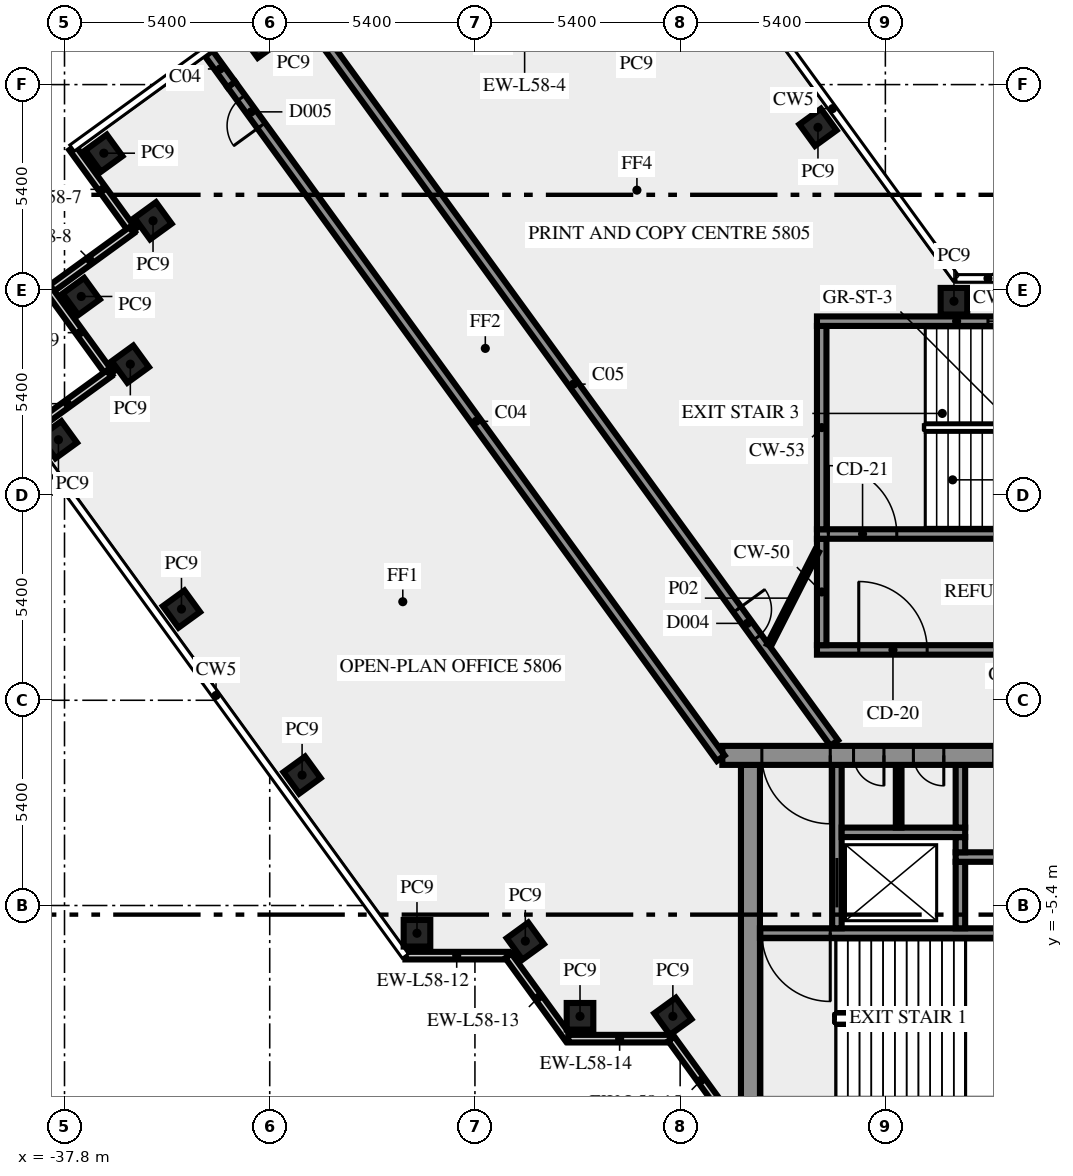
"""IFC4 building model, lengths in metres.
Left out: names, types, materials, properties, quantities, classifications, styles, units other than length and angle.
Written with IfcOpenShell. Run it as: python <this file> out.ifc"""

import sys

from ifc_helpers import new_model, si_unit, direction, frame, frame_2d, origin, origin_2d, place, context, subcontext, project, spatial, rectangle, extrude, element, fill, save


model = new_model("IFC4")
c1 = context("Model", 3, precision=1e-05, world=origin(), true_north=direction((0.0, 1.0)))
c2 = subcontext(c1, "Body", "Model", "MODEL_VIEW")
j1 = project(units=[si_unit("LENGTHUNIT", "METRE"), si_unit("PLANEANGLEUNIT", "RADIAN")], contexts=[c1])
p1 = place(None, origin())
s1 = spatial("IfcSite", under=j1, at=p1, CompositionType="ELEMENT")
p2 = place(p1, origin())
s2 = spatial("IfcBuilding", under=s1, at=p2, CompositionType="ELEMENT")
p3 = place(p2, frame((0.0, 0.0, 248.0)))
s3 = spatial("IfcBuildingStorey", under=s2, at=p3, CompositionType="ELEMENT", Elevation=248.0)
for number, where, z_axis, x_axis in (
    (1, (-17.974, 15.075, 0.0), (0.0, 0.0, 1.0), (-0.588, 0.809, 0.0)),
    (2, (-32.637, 17.393, 0.0), (0.0, 0.0, 1.0), (-0.809, -0.588, 0.0)),
    (3, (-36.765, 14.395, 0.0), (0.0, 0.0, 1.0), (0.588, -0.809, 0.0)),
    (4, (-35.471, 12.616, 0.0), (0.0, 0.0, 1.0), (-0.809, -0.588, 0.0)),
    (5, (-37.36, 10.625, 0.0), (0.0, 0.0, 1.0), (0.588, -0.809, 0.0)),
    (6, (-36.068, 8.844, 0.0), (0.0, 0.0, 1.0), (0.588, -0.809, 0.0)),
    (7, (-37.96, 6.855, 0.0), (0.0, 0.0, 1.0), (0.588, -0.809, 0.0)),
    (8, (-34.722, 2.4, 0.0), (0.0, 0.0, 1.0), (0.588, -0.809, 0.0)),
    (9, (-31.548, -1.969, 0.0), (0.0, 0.0, 1.0), (0.588, -0.809, 0.0)),
    (10, (-28.525, -6.13, 0.0), (0.0, 0.0, 1.0), (1.0, 0.0, 0.0)),
    (11, (-25.674, -6.337, 0.0), (0.0, 0.0, 1.0), (0.588, -0.809, 0.0)),
    (12, (-24.235, -8.315, 0.0), (0.0, 0.0, 1.0), (1.0, 0.0, 0.0)),
    (13, (-21.792, -8.315, 0.0), (0.0, 0.0, 1.0), (0.588, -0.809, 0.0)),
    (14, (-14.395, 10.5, 0.0), (0.0, 0.0, 1.0), (-1.0, 0.0, 0.0)),
):
    element("IfcColumn", number, at=place(p3, frame(where, z_axis=z_axis, x_axis=x_axis)), inside=s3, PredefinedType="COLUMN", context=c2, shape_type="SweptSolid", body=[
        extrude(rectangle(XDim=0.7, YDim=0.7, at=origin_2d()), origin(), (0.0, 0.0, 1.0), 4.65),
    ])
for number, where, z_axis, x_axis in (
    (15, (-37.592, 14.536, 0.0), (0.0, 0.0, 1.0), (0.588, -0.809, 0.0)),
    (16, (-36.032, 12.369, 0.0), (0.0, 0.0, 1.0), (-0.809, -0.588, 0.0)),
    (17, (-38.189, 10.765, 0.0), (0.0, 0.0, 1.0), (0.588, -0.809, 0.0)),
    (18, (-36.629, 8.597, 0.0), (0.0, 0.0, 1.0), (-0.809, -0.588, 0.0)),
    (19, (-28.83, -6.719, 0.0), (0.0, 0.0, 1.0), (1.0, 0.0, 0.0)),
):
    element("IfcWall", number, at=place(p3, frame(where, z_axis=z_axis, x_axis=x_axis)), inside=s3, PredefinedType="SOLIDWALL", context=c2, shape_type="SweptSolid", body=[
        extrude(rectangle(XDim=2.7, YDim=0.2, at=frame_2d((1.35, 0.0))), origin(), (0.0, 0.0, 1.0), 4.65),
    ])
p4 = place(p3, frame((-26.12, -6.724, 0.0), z_axis=(0.0, 0.0, 1.0), x_axis=(0.587720002413, -0.809064397168, 0.0)))
e20 = element("IfcWall", 20, at=p4, inside=s3, PredefinedType="SOLIDWALL", context=c2, shape_type="SweptSolid", body=[
    extrude(rectangle(XDim=2.7, YDim=0.2, at=frame_2d((1.35, 0.0))), origin(), (0.0, 0.0, 1.0), 4.65),
])
p5 = place(p3, frame((-24.543, -8.904, 0.0), z_axis=(0.0, 0.0, 1.0), x_axis=(1.0, 0.0, 0.0)))
e21 = element("IfcWall", 21, at=p5, inside=s3, PredefinedType="SOLIDWALL", context=c2, shape_type="SweptSolid", body=[
    extrude(rectangle(XDim=2.7, YDim=0.2, at=frame_2d((1.35, 0.0))), origin(), (0.0, 0.0, 1.0), 4.65),
])
p6 = place(p3, frame((-21.833, -8.909, 0.0), z_axis=(0.0, 0.0, 1.0), x_axis=(0.587766567315, -0.809030569476, 0.0)))
e22 = element("IfcWall", 22, at=p6, inside=s3, PredefinedType="SOLIDWALL", context=c2, shape_type="SweptSolid", body=[
    extrude(rectangle(XDim=2.688, YDim=0.2, at=frame_2d((1.344, 0.0))), origin(), (0.0, 0.0, 1.0), 4.65),
])
p7 = place(p3, frame((-19.75, -10.5, 0.0), z_axis=(0.0, 0.0, 1.0), x_axis=(0.0, 1.0, 0.0)))
e23 = element("IfcWall", 23, at=p7, inside=s3, PredefinedType="SHEAR", context=c2, shape_type="SweptSolid", body=[
    extrude(rectangle(XDim=8.8, YDim=0.5, at=frame_2d((4.4, 0.0))), origin(), (0.0, 0.0, 1.0), 4.65),
])
p8 = place(p3, frame((-11.45, -6.125, 0.0), z_axis=(0.0, 0.0, 1.0), x_axis=(-1.0, 0.0, 0.0)))
e24 = element("IfcWall", 24, at=p8, inside=s3, PredefinedType="SHEAR", context=c2, shape_type="SweptSolid", body=[
    extrude(rectangle(XDim=8.05, YDim=0.25, at=frame_2d((4.025, 0.0))), origin(), (0.0, 0.0, 1.0), 4.65),
])
p9 = place(p8, frame((6.2, 0.0, 0.0)))
e25 = element("IfcOpeningElement", 25, at=p9, cuts=e24, PredefinedType="OPENING", context=c2, shape_type="SweptSolid", body=[
    extrude(rectangle(XDim=1.8, YDim=2.1, at=frame_2d((0.9, 1.05))), frame((0.0, 0.135, 0.0), z_axis=(0.0, -1.0, 0.0), x_axis=(1.0, 0.0, 0.0)), (0.0, 0.0, 1.0), 0.27),
])
p10 = place(p3, frame((-17.475, -6.0, 0.0), z_axis=(0.0, 0.0, 1.0), x_axis=(0.0, 1.0, 0.0)))
e26 = element("IfcWall", 26, at=p10, inside=s3, PredefinedType="SHEAR", context=c2, shape_type="SweptSolid", body=[
    extrude(rectangle(XDim=4.3, YDim=0.25, at=frame_2d((2.15, 0.0))), origin(), (0.0, 0.0, 1.0), 4.65),
])
p11 = place(p10, frame((0.55, 0.0, 0.0)))
e27 = element("IfcOpeningElement", 27, at=p11, cuts=e26, PredefinedType="OPENING", context=c2, shape_type="SweptSolid", body=[
    extrude(rectangle(XDim=1.3, YDim=2.1, at=frame_2d((0.65, 1.05))), frame((0.0, 0.135, 0.0), z_axis=(0.0, -1.0, 0.0), x_axis=(1.0, 0.0, 0.0)), (0.0, 0.0, 1.0), 0.27),
])
p12 = place(p3, frame((-14.225, -6.0, 0.0), z_axis=(0.0, 0.0, 1.0), x_axis=(0.0, 1.0, 0.0)))
e28 = element("IfcWall", 28, at=p12, inside=s3, PredefinedType="SHEAR", context=c2, shape_type="SweptSolid", body=[
    extrude(rectangle(XDim=1.75, YDim=0.25, at=frame_2d((0.875, 0.0))), origin(), (0.0, 0.0, 1.0), 4.65),
])
p13 = place(p3, frame((-14.35, -4.125, 0.0), z_axis=(0.0, 0.0, 1.0), x_axis=(1.0, 0.0, 0.0)))
e29 = element("IfcWall", 29, at=p13, inside=s3, PredefinedType="SHEAR", context=c2, shape_type="SweptSolid", body=[
    extrude(rectangle(XDim=12.7, YDim=0.25, at=frame_2d((6.35, 0.0))), origin(), (0.0, 0.0, 1.0), 4.65),
])
p14 = place(p13, frame((4.75, 0.0, 0.0)))
e30 = element("IfcOpeningElement", 30, at=p14, cuts=e29, PredefinedType="OPENING", context=c2, shape_type="SweptSolid", body=[
    extrude(rectangle(XDim=1.1, YDim=2.1, at=frame_2d((0.55, 1.05))), frame((0.0, 0.135, 0.0), z_axis=(0.0, -1.0, 0.0), x_axis=(1.0, 0.0, 0.0)), (0.0, 0.0, 1.0), 0.27),
])
p15 = place(p13, frame((7.25, 0.0, 0.0)))
e31 = element("IfcOpeningElement", 31, at=p15, cuts=e29, PredefinedType="OPENING", context=c2, shape_type="SweptSolid", body=[
    extrude(rectangle(XDim=1.1, YDim=2.1, at=frame_2d((0.55, 1.05))), frame((0.0, 0.135, 0.0), z_axis=(0.0, -1.0, 0.0), x_axis=(1.0, 0.0, 0.0)), (0.0, 0.0, 1.0), 0.27),
])
p16 = place(p3, frame((-14.225, -4.0, 0.0), z_axis=(0.0, 0.0, 1.0), x_axis=(0.0, 1.0, 0.0)))
e32 = element("IfcWall", 32, at=p16, inside=s3, PredefinedType="SHEAR", context=c2, shape_type="SweptSolid", body=[
    extrude(rectangle(XDim=0.4, YDim=0.25, at=frame_2d((0.2, 0.0))), origin(), (0.0, 0.0, 1.0), 4.65),
])
p17 = place(p3, frame((-17.35, -3.475, 0.0), z_axis=(0.0, 0.0, 1.0), x_axis=(1.0, 0.0, 0.0)))
e33 = element("IfcWall", 33, at=p17, inside=s3, PredefinedType="SHEAR", context=c2, shape_type="SweptSolid", body=[
    extrude(rectangle(XDim=3.25, YDim=0.25, at=frame_2d((1.625, 0.0))), origin(), (0.0, 0.0, 1.0), 4.65),
])
p18 = place(p3, frame((-15.85, -3.35, 0.0), z_axis=(0.0, 0.0, 1.0), x_axis=(0.0, 1.0, 0.0)))
e34 = element("IfcWall", 34, at=p18, inside=s3, PredefinedType="PARTITIONING", context=c2, shape_type="SweptSolid", body=[
    extrude(rectangle(XDim=1.65, YDim=0.15, at=frame_2d((0.825, 0.0))), origin(), (0.0, 0.0, 1.0), 4.65),
])
p19 = place(p3, frame((-14.225, -3.35, 0.0), z_axis=(0.0, 0.0, 1.0), x_axis=(0.0, 1.0, 0.0)))
e35 = element("IfcWall", 35, at=p19, inside=s3, PredefinedType="SHEAR", context=c2, shape_type="SweptSolid", body=[
    extrude(rectangle(XDim=1.65, YDim=0.25, at=frame_2d((0.825, 0.0))), origin(), (0.0, 0.0, 1.0), 4.65),
])
p20 = place(p3, frame((20.49, -1.45, 0.0), z_axis=(0.0, 0.0, 1.0), x_axis=(-1.0, 0.0, 0.0)))
e36 = element("IfcWall", 36, at=p20, inside=s3, PredefinedType="SHEAR", context=c2, shape_type="SweptSolid", body=[
    extrude(rectangle(XDim=40.98, YDim=0.5, at=frame_2d((20.49, 0.0))), origin(), (0.0, 0.0, 1.0), 4.65),
])
p21 = place(p20, frame((38.14, 0.0, 0.0)))
e37 = element("IfcOpeningElement", 37, at=p21, cuts=e36, PredefinedType="OPENING", context=c2, shape_type="SweptSolid", body=[
    extrude(rectangle(XDim=1.8, YDim=2.1, at=frame_2d((0.9, 1.05))), frame((0.0, 0.26, 0.0), z_axis=(0.0, -1.0, 0.0), x_axis=(1.0, 0.0, 0.0)), (0.0, 0.0, 1.0), 0.52),
])
p22 = place(p20, frame((36.728, 0.0, 0.0)))
e38 = element("IfcOpeningElement", 38, at=p22, cuts=e36, PredefinedType="OPENING", context=c2, shape_type="SweptSolid", body=[
    extrude(rectangle(XDim=0.8, YDim=2.1, at=frame_2d((0.4, 1.05))), frame((0.0, 0.26, 0.0), z_axis=(0.0, -1.0, 0.0), x_axis=(1.0, 0.0, 0.0)), (0.0, 0.0, 1.0), 0.52),
])
p23 = place(p20, frame((35.153, 0.0, 0.0)))
e39 = element("IfcOpeningElement", 39, at=p23, cuts=e36, PredefinedType="OPENING", context=c2, shape_type="SweptSolid", body=[
    extrude(rectangle(XDim=0.8, YDim=2.1, at=frame_2d((0.4, 1.05))), frame((0.0, 0.26, 0.0), z_axis=(0.0, -1.0, 0.0), x_axis=(1.0, 0.0, 0.0)), (0.0, 0.0, 1.0), 0.52),
])
p24 = place(p20, frame((32.94, 0.0, 0.0)))
e40 = element("IfcOpeningElement", 40, at=p24, cuts=e36, PredefinedType="OPENING", context=c2, shape_type="SweptSolid", body=[
    extrude(rectangle(XDim=0.9, YDim=2.1, at=frame_2d((0.45, 1.05))), frame((0.0, 0.26, 0.0), z_axis=(0.0, -1.0, 0.0), x_axis=(1.0, 0.0, 0.0)), (0.0, 0.0, 1.0), 0.52),
])
p25 = place(p20, frame((31.015, 0.0, 0.0)))
e41 = element("IfcOpeningElement", 41, at=p25, cuts=e36, PredefinedType="OPENING", context=c2, shape_type="SweptSolid", body=[
    extrude(rectangle(XDim=0.8, YDim=2.1, at=frame_2d((0.4, 1.05))), frame((0.0, 0.26, 0.0), z_axis=(0.0, -1.0, 0.0), x_axis=(1.0, 0.0, 0.0)), (0.0, 0.0, 1.0), 0.52),
])
p26 = place(p20, frame((24.765, 0.0, 0.0)))
e42 = element("IfcOpeningElement", 42, at=p26, cuts=e36, PredefinedType="OPENING", context=c2, shape_type="SweptSolid", body=[
    extrude(rectangle(XDim=0.8, YDim=2.1, at=frame_2d((0.4, 1.05))), frame((0.0, 0.26, 0.0), z_axis=(0.0, -1.0, 0.0), x_axis=(1.0, 0.0, 0.0)), (0.0, 0.0, 1.0), 0.52),
])
p27 = place(p20, frame((19.59, 0.0, 0.0)))
e43 = element("IfcOpeningElement", 43, at=p27, cuts=e36, PredefinedType="OPENING", context=c2, shape_type="SweptSolid", body=[
    extrude(rectangle(XDim=2.0, YDim=2.1, at=frame_2d((1.0, 1.05))), frame((0.0, 0.26, 0.0), z_axis=(0.0, -1.0, 0.0), x_axis=(1.0, 0.0, 0.0)), (0.0, 0.0, 1.0), 0.52),
])
p28 = place(p20, frame((7.14, 0.0, 0.0)))
e44 = element("IfcOpeningElement", 44, at=p28, cuts=e36, PredefinedType="OPENING", context=c2, shape_type="SweptSolid", body=[
    extrude(rectangle(XDim=0.9, YDim=2.1, at=frame_2d((0.45, 1.05))), frame((0.0, 0.26, 0.0), z_axis=(0.0, -1.0, 0.0), x_axis=(1.0, 0.0, 0.0)), (0.0, 0.0, 1.0), 0.52),
])
p29 = place(p20, frame((4.19, 0.0, 0.0)))
e45 = element("IfcOpeningElement", 45, at=p29, cuts=e36, PredefinedType="OPENING", context=c2, shape_type="SweptSolid", body=[
    extrude(rectangle(XDim=0.9, YDim=2.1, at=frame_2d((0.45, 1.05))), frame((0.0, 0.26, 0.0), z_axis=(0.0, -1.0, 0.0), x_axis=(1.0, 0.0, 0.0)), (0.0, 0.0, 1.0), 0.52),
])
p30 = place(p20, frame((1.04, 0.0, 0.0)))
e46 = element("IfcOpeningElement", 46, at=p30, cuts=e36, PredefinedType="OPENING", context=c2, shape_type="SweptSolid", body=[
    extrude(rectangle(XDim=1.8, YDim=2.1, at=frame_2d((0.9, 1.05))), frame((0.0, 0.26, 0.0), z_axis=(0.0, -1.0, 0.0), x_axis=(1.0, 0.0, 0.0)), (0.0, 0.0, 1.0), 0.52),
])
p31 = place(p3, frame((-18.0, 1.325, 0.0), z_axis=(0.0, 0.0, 1.0), x_axis=(1.0, 0.0, 0.0)))
e47 = element("IfcWall", 47, at=p31, inside=s3, PredefinedType="SHEAR", context=c2, shape_type="SweptSolid", body=[
    extrude(rectangle(XDim=10.5, YDim=0.25, at=frame_2d((5.25, 0.0))), origin(), (0.0, 0.0, 1.0), 4.65),
])
p32 = place(p31, frame((1.1, 0.0, 0.0)))
e48 = element("IfcOpeningElement", 48, at=p32, cuts=e47, PredefinedType="OPENING", context=c2, shape_type="SweptSolid", body=[
    extrude(rectangle(XDim=1.8, YDim=2.1, at=frame_2d((0.9, 1.05))), frame((0.0, 0.135, 0.0), z_axis=(0.0, -1.0, 0.0), x_axis=(1.0, 0.0, 0.0)), (0.0, 0.0, 1.0), 0.27),
])
p33 = place(p3, frame((-17.875, 1.45, 0.0), z_axis=(0.0, 0.0, 1.0), x_axis=(0.0, 1.0, 0.0)))
e49 = element("IfcWall", 49, at=p33, inside=s3, PredefinedType="SHEAR", context=c2, shape_type="SweptSolid", body=[
    extrude(rectangle(XDim=2.8, YDim=0.25, at=frame_2d((1.4, 0.0))), origin(), (0.0, 0.0, 1.0), 4.65),
])
p34 = place(p3, frame((-18.0, 4.375, 0.0), z_axis=(0.0, 0.0, 1.0), x_axis=(1.0, 0.0, 0.0)))
e50 = element("IfcWall", 50, at=p34, inside=s3, PredefinedType="SHEAR", context=c2, shape_type="SweptSolid", body=[
    extrude(rectangle(XDim=10.5, YDim=0.25, at=frame_2d((5.25, 0.0))), origin(), (0.0, 0.0, 1.0), 4.65),
])
p35 = place(p34, frame((0.3, 0.0, 0.0)))
e51 = element("IfcOpeningElement", 51, at=p35, cuts=e50, PredefinedType="OPENING", context=c2, shape_type="SweptSolid", body=[
    extrude(rectangle(XDim=1.8, YDim=2.1, at=frame_2d((0.9, 1.05))), frame((0.0, 0.135, 0.0), z_axis=(0.0, -1.0, 0.0), x_axis=(1.0, 0.0, 0.0)), (0.0, 0.0, 1.0), 0.27),
])
p36 = place(p3, frame((-17.875, 4.5, 0.0), z_axis=(0.0, 0.0, 1.0), x_axis=(0.0, 1.0, 0.0)))
e52 = element("IfcWall", 52, at=p36, inside=s3, PredefinedType="SHEAR", context=c2, shape_type="SweptSolid", body=[
    extrude(rectangle(XDim=5.35, YDim=0.25, at=frame_2d((2.675, 0.0))), origin(), (0.0, 0.0, 1.0), 4.65),
])
p37 = place(p3, frame((-18.0, 9.975, 0.0), z_axis=(0.0, 0.0, 1.0), x_axis=(1.0, 0.0, 0.0)))
e53 = element("IfcWall", 53, at=p37, inside=s3, PredefinedType="SHEAR", context=c2, shape_type="SweptSolid", body=[
    extrude(rectangle(XDim=10.5, YDim=0.25, at=frame_2d((5.25, 0.0))), origin(), (0.0, 0.0, 1.0), 4.65),
])
p38 = place(p37, frame((4.5, 0.0, 1.0)))
e54 = element("IfcOpeningElement", 54, at=p38, cuts=e53, PredefinedType="OPENING", context=c2, shape_type="SweptSolid", body=[
    extrude(rectangle(XDim=1.2, YDim=1.2, at=frame_2d((0.6, 0.6))), frame((0.0, 0.135, 0.0), z_axis=(0.0, -1.0, 0.0), x_axis=(1.0, 0.0, 0.0)), (0.0, 0.0, 1.0), 0.27),
])
p39 = place(p3, frame((-20.531, -1.523, 0.0), z_axis=(0.0, 0.0, 1.0), x_axis=(-0.587786711753, 0.809015934013, 0.0)))
e55 = element("IfcWall", 55, at=p39, inside=s3, PredefinedType="SOLIDWALL", context=c2, shape_type="SweptSolid", body=[
    extrude(rectangle(XDim=21.911, YDim=0.25, at=frame_2d((10.956, 0.0))), origin(), (0.0, 0.0, 1.0), 4.65),
])
p40 = place(p39, frame((20.571, 0.0, 0.0)))
e56 = element("IfcOpeningElement", 56, at=p40, cuts=e55, PredefinedType="OPENING", context=c2, shape_type="SweptSolid", body=[
    extrude(rectangle(XDim=0.9, YDim=2.1, at=frame_2d((0.45, 1.05))), frame((0.0, 0.135, 0.0), z_axis=(0.0, -1.0, 0.0), x_axis=(1.0, 0.0, 0.0)), (0.0, 0.0, 1.0), 0.27),
])
p41 = place(p3, frame((-31.267, 17.762, 0.0), z_axis=(0.0, 0.0, 1.0), x_axis=(0.587787966774, -0.809015022181, 0.0)))
e57 = element("IfcWall", 57, at=p41, inside=s3, PredefinedType="SOLIDWALL", context=c2, shape_type="SweptSolid", body=[
    extrude(rectangle(XDim=23.345, YDim=0.25, at=frame_2d((11.672, 0.0))), origin(), (0.0, 0.0, 1.0), 4.65),
])
p42 = place(p41, frame((19.004, 0.0, 0.0)))
e58 = element("IfcOpeningElement", 58, at=p42, cuts=e57, PredefinedType="OPENING", context=c2, shape_type="SweptSolid", body=[
    extrude(rectangle(XDim=0.9, YDim=2.1, at=frame_2d((0.45, 1.05))), frame((0.0, 0.135, 0.0), z_axis=(0.0, -1.0, 0.0), x_axis=(1.0, 0.0, 0.0)), (0.0, 0.0, 1.0), 0.27),
])
p43 = place(p3, frame((-19.261, 1.45, 0.0), z_axis=(0.0, 0.0, 1.0), x_axis=(0.453950796792, 0.891026752736, 0.0)))
e59 = element("IfcWall", 59, at=p43, inside=s3, PredefinedType="PARTITIONING", context=c2, shape_type="SweptSolid", body=[
    extrude(rectangle(XDim=2.778, YDim=0.12, at=frame_2d((1.389, 0.0))), origin(), (0.0, 0.0, 1.0), 4.65),
])
p44 = place(p3, frame((-33.41, 16.203, 0.0), z_axis=(0.0, 0.0, 1.0), x_axis=(-0.587696850957, 0.809081214326, 0.0)))
e60 = element("IfcWall", 60, at=p44, inside=s3, PredefinedType="SOLIDWALL", context=c2, shape_type="SweptSolid", body=[
    extrude(rectangle(XDim=1.009, YDim=0.25, at=frame_2d((0.504, 0.0))), origin(), (0.0, 0.0, 1.0), 3.95),
])
p45 = place(p9, origin())
e61 = element("IfcDoor", 61, at=p45, inside=s3, OperationType="DOUBLE_DOOR_SINGLE_SWING", PredefinedType="DOOR", context=c2, shape_type="SweptSolid", body=[
    extrude(rectangle(XDim=1.8, YDim=2.1, at=frame_2d((0.9, 1.05))), frame((0.0, 0.025, 0.0), z_axis=(0.0, -1.0, 0.0), x_axis=(1.0, 0.0, 0.0)), (0.0, 0.0, 1.0), 0.05),
])
fill(e25, e61)
p46 = place(p11, origin())
e62 = element("IfcDoor", 62, at=p46, inside=s3, OperationType="DOUBLE_DOOR_SLIDING", PredefinedType="DOOR", context=c2, shape_type="SweptSolid", body=[
    extrude(rectangle(XDim=1.3, YDim=2.1, at=frame_2d((0.65, 1.05))), frame((0.0, 0.025, 0.0), z_axis=(0.0, -1.0, 0.0), x_axis=(1.0, 0.0, 0.0)), (0.0, 0.0, 1.0), 0.05),
])
fill(e27, e62)
p47 = place(p21, origin())
e63 = element("IfcDoor", 63, at=p47, inside=s3, OperationType="DOUBLE_DOOR_SINGLE_SWING", PredefinedType="DOOR", context=c2, shape_type="SweptSolid", body=[
    extrude(rectangle(XDim=1.8, YDim=2.1, at=frame_2d((0.9, 1.05))), frame((0.0, 0.025, 0.0), z_axis=(0.0, -1.0, 0.0), x_axis=(1.0, 0.0, 0.0)), (0.0, 0.0, 1.0), 0.05),
])
fill(e37, e63)
p48 = place(p22, origin())
e64 = element("IfcDoor", 64, at=p48, inside=s3, OperationType="SINGLE_SWING_RIGHT", PredefinedType="DOOR", context=c2, shape_type="SweptSolid", body=[
    extrude(rectangle(XDim=0.8, YDim=2.1, at=frame_2d((0.4, 1.05))), frame((0.0, 0.025, 0.0), z_axis=(0.0, -1.0, 0.0), x_axis=(1.0, 0.0, 0.0)), (0.0, 0.0, 1.0), 0.05),
])
fill(e38, e64)
p49 = place(p23, origin())
e65 = element("IfcDoor", 65, at=p49, inside=s3, OperationType="SINGLE_SWING_RIGHT", PredefinedType="DOOR", context=c2, shape_type="SweptSolid", body=[
    extrude(rectangle(XDim=0.8, YDim=2.1, at=frame_2d((0.4, 1.05))), frame((0.0, 0.025, 0.0), z_axis=(0.0, -1.0, 0.0), x_axis=(1.0, 0.0, 0.0)), (0.0, 0.0, 1.0), 0.05),
])
fill(e39, e65)
p50 = place(p32, origin())
e66 = element("IfcDoor", 66, at=p50, inside=s3, OperationType="DOUBLE_DOOR_SINGLE_SWING", PredefinedType="DOOR", context=c2, shape_type="SweptSolid", body=[
    extrude(rectangle(XDim=1.8, YDim=2.1, at=frame_2d((0.9, 1.05))), frame((0.0, 0.025, 0.0), z_axis=(0.0, -1.0, 0.0), x_axis=(1.0, 0.0, 0.0)), (0.0, 0.0, 1.0), 0.05),
])
fill(e48, e66)
p51 = place(p35, origin())
e67 = element("IfcDoor", 67, at=p51, inside=s3, OperationType="DOUBLE_DOOR_SINGLE_SWING", PredefinedType="DOOR", context=c2, shape_type="SweptSolid", body=[
    extrude(rectangle(XDim=1.8, YDim=2.1, at=frame_2d((0.9, 1.05))), frame((0.0, 0.025, 0.0), z_axis=(0.0, -1.0, 0.0), x_axis=(1.0, 0.0, 0.0)), (0.0, 0.0, 1.0), 0.05),
])
fill(e51, e67)
p52 = place(p38, origin())
e68 = element("IfcWindow", 68, at=p52, inside=s3, PartitioningType="SINGLE_PANEL", PredefinedType="WINDOW", context=c2, shape_type="SweptSolid", body=[
    extrude(rectangle(XDim=1.2, YDim=1.2, at=frame_2d((0.6, 0.6))), frame((0.0, 0.03, 0.0), z_axis=(0.0, -1.0, 0.0), x_axis=(1.0, 0.0, 0.0)), (0.0, 0.0, 1.0), 0.06),
])
fill(e54, e68)
p53 = place(p40, origin())
e69 = element("IfcDoor", 69, at=p53, inside=s3, OperationType="SINGLE_SWING_RIGHT", PredefinedType="DOOR", context=c2, shape_type="SweptSolid", body=[
    extrude(rectangle(XDim=0.9, YDim=2.1, at=frame_2d((0.45, 1.05))), frame((0.0, 0.025, 0.0), z_axis=(0.0, -1.0, 0.0), x_axis=(1.0, 0.0, 0.0)), (0.0, 0.0, 1.0), 0.05),
])
fill(e56, e69)
p54 = place(p42, origin())
e70 = element("IfcDoor", 70, at=p54, inside=s3, OperationType="SINGLE_SWING_RIGHT", PredefinedType="DOOR", context=c2, shape_type="SweptSolid", body=[
    extrude(rectangle(XDim=0.9, YDim=2.1, at=frame_2d((0.45, 1.05))), frame((0.0, 0.025, 0.0), z_axis=(0.0, -1.0, 0.0), x_axis=(1.0, 0.0, 0.0)), (0.0, 0.0, 1.0), 0.05),
])
fill(e58, e70)
save(model, sys.argv[1])
